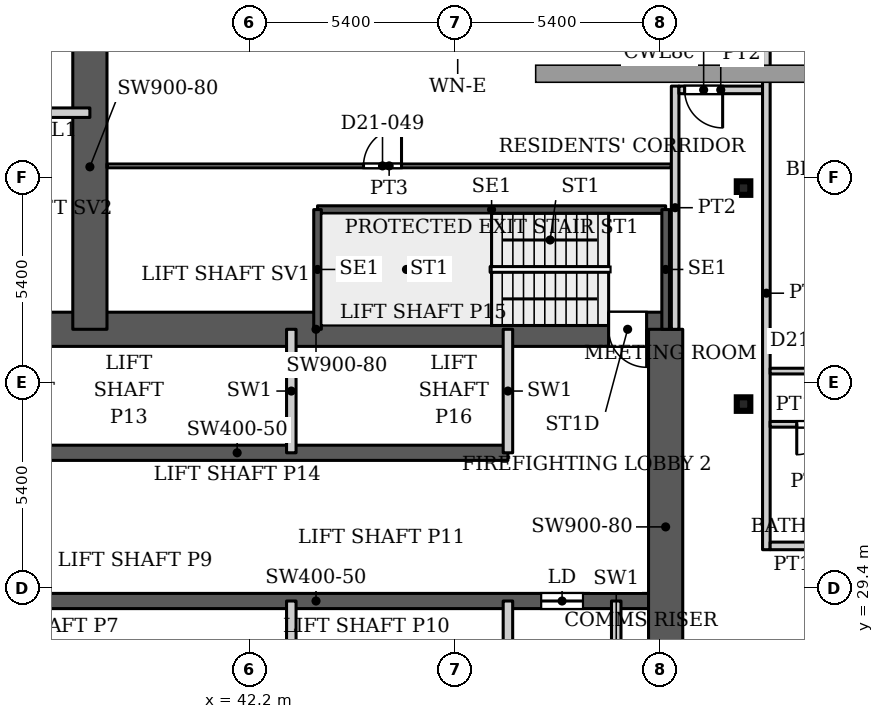
"""IFC4 building model, lengths in metres.
Left out: names, types, materials, properties, quantities, classifications, styles, units other than length and angle.
Written with IfcOpenShell. Run it as: python <this file> out.ifc"""

import sys

from ifc_helpers import new_model, si_unit, direction, frame, frame_2d, origin, origin_2d, place, context, subcontext, project, spatial, rectangle, hollow_rectangle, extrude, source, transform, mapped, element, fill, save


model = new_model("IFC4")
c1 = context("Model", 3, precision=1e-05, world=origin(), true_north=direction((0.0, 1.0)))
c2 = subcontext(c1, "Body", "Model", "MODEL_VIEW")
j1 = project(units=[si_unit("LENGTHUNIT", "METRE"), si_unit("PLANEANGLEUNIT", "RADIAN")], contexts=[c1])
p1 = place(None, origin())
s1 = spatial("IfcSite", under=j1, at=p1, CompositionType="ELEMENT")
p2 = place(p1, origin())
s2 = spatial("IfcBuilding", under=s1, at=p2, CompositionType="ELEMENT")
p3 = place(p2, frame((0.0, 0.0, 98.0)))
s3 = spatial("IfcBuildingStorey", under=s2, at=p3, CompositionType="ELEMENT", Elevation=98.0)
for number, where, z_axis, x_axis in (
    (1, (55.2, 34.232, 0.0), (0.0, 0.0, 1.0), (1.0, 0.0, 0.0)),
    (2, (55.2, 39.916, 0.0), (0.0, 0.0, 1.0), (1.0, 0.0, 0.0)),
):
    element("IfcColumn", number, at=place(p3, frame(where, z_axis=z_axis, x_axis=x_axis)), inside=s3, PredefinedType="COLUMN", context=c2, shape_type="SweptSolid", body=[
        extrude(hollow_rectangle(XDim=0.356, YDim=0.356, WallThickness=0.016, InnerFilletRadius=0.016, OuterFilletRadius=0.032, at=origin_2d()), origin(), (0.0, 0.0, 1.0), 3.9),
    ])
p4 = place(p3, frame((34.75, 29.05, 0.0), z_axis=(0.0, 0.0, 1.0), x_axis=(1.0, 0.0, 0.0)))
e3 = element("IfcWall", 3, at=p4, inside=s3, PredefinedType="SHEAR", context=c2, shape_type="SweptSolid", body=[
    extrude(rectangle(XDim=18.4, YDim=0.4, at=frame_2d((9.2, 0.0))), origin(), (0.0, 0.0, 1.0), 3.9),
])
p5 = place(p4, frame((15.125, 0.0, 0.0)))
e4 = element("IfcOpeningElement", 4, at=p5, cuts=e3, PredefinedType="OPENING", context=c2, shape_type="SweptSolid", body=[
    extrude(rectangle(XDim=1.1, YDim=2.2, at=frame_2d((0.55, 1.1))), frame((0.0, 0.21, 0.0), z_axis=(0.0, -1.0, 0.0), x_axis=(1.0, 0.0, 0.0)), (0.0, 0.0, 1.0), 0.42),
])
p6 = place(p3, frame((34.75, 32.95, 0.0), z_axis=(0.0, 0.0, 1.0), x_axis=(1.0, 0.0, 0.0)))
e5 = element("IfcWall", 5, at=p6, inside=s3, PredefinedType="SHEAR", context=c2, shape_type="SweptSolid", body=[
    extrude(rectangle(XDim=14.25, YDim=0.4, at=frame_2d((7.125, 0.0))), origin(), (0.0, 0.0, 1.0), 3.9),
])
p7 = place(p3, frame((34.75, 36.2, 0.0), z_axis=(0.0, 0.0, 1.0), x_axis=(1.0, 0.0, 0.0)))
e6 = element("IfcWall", 6, at=p7, inside=s3, PredefinedType="SHEAR", context=c2, shape_type="SweptSolid", body=[
    extrude(rectangle(XDim=18.4, YDim=0.9, at=frame_2d((9.2, 0.0))), origin(), (0.0, 0.0, 1.0), 3.9),
])
p8 = place(p7, frame((16.9, 0.0, 0.0)))
e7 = element("IfcOpeningElement", 7, at=p8, cuts=e6, PredefinedType="OPENING", context=c2, shape_type="SweptSolid", body=[
    extrude(rectangle(XDim=1.0, YDim=2.2, at=frame_2d((0.5, 1.1))), frame((0.0, 0.46, 0.0), z_axis=(0.0, -1.0, 0.0), x_axis=(1.0, 0.0, 0.0)), (0.0, 0.0, 1.0), 0.92),
])
p9 = place(p3, frame((38.0, 36.2, 0.0), z_axis=(0.0, 0.0, 1.0), x_axis=(0.0, 1.0, 0.0)))
e8 = element("IfcWall", 8, at=p9, inside=s3, PredefinedType="SHEAR", context=c2, shape_type="SweptSolid", body=[
    extrude(rectangle(XDim=8.55, YDim=0.9, at=frame_2d((4.275, 0.0))), origin(), (0.0, 0.0, 1.0), 3.9),
])
p10 = place(p3, frame((53.15, 25.8, 0.0), z_axis=(0.0, 0.0, 1.0), x_axis=(0.0, 1.0, 0.0)))
e9 = element("IfcWall", 9, at=p10, inside=s3, PredefinedType="SHEAR", context=c2, shape_type="SweptSolid", body=[
    extrude(rectangle(XDim=10.4, YDim=0.9, at=frame_2d((5.2, 0.0))), origin(), (0.0, 0.0, 1.0), 3.9),
])
p11 = place(p3, frame((43.99, 39.35, 0.0), z_axis=(0.0, 0.0, 1.0), x_axis=(1.0, 0.0, 0.0)))
e10 = element("IfcWall", 10, at=p11, inside=s3, PredefinedType="SHEAR", context=c2, shape_type="SweptSolid", body=[
    extrude(rectangle(XDim=9.16, YDim=0.2, at=frame_2d((4.58, 0.0))), origin(), (0.0, 0.0, 1.0), 3.9),
])
for number, where, z_axis, x_axis in (
    (11, (43.99, 36.2, 0.0), (0.0, 0.0, 1.0), (0.0, 1.0, 0.0)),
    (12, (53.15, 36.2, 0.0), (0.0, 0.0, 1.0), (0.0, 1.0, 0.0)),
):
    element("IfcWall", number, at=place(p3, frame(where, z_axis=z_axis, x_axis=x_axis)), inside=s3, PredefinedType="SHEAR", context=c2, shape_type="SweptSolid", body=[
        extrude(rectangle(XDim=3.15, YDim=0.2, at=frame_2d((1.575, 0.0))), origin(), (0.0, 0.0, 1.0), 3.9),
    ])
for number, where, z_axis, x_axis in (
    (13, (43.3, 25.8, 0.0), (0.0, 0.0, 1.0), (0.0, 1.0, 0.0)),
    (14, (43.3, 32.95, 0.0), (0.0, 0.0, 1.0), (0.0, 1.0, 0.0)),
    (15, (49.0, 25.8, 0.0), (0.0, 0.0, 1.0), (0.0, 1.0, 0.0)),
    (16, (49.0, 32.95, 0.0), (0.0, 0.0, 1.0), (0.0, 1.0, 0.0)),
    (17, (51.85, 25.8, 0.0), (0.0, 0.0, 1.0), (0.0, 1.0, 0.0)),
    (18, (34.75, 41.9, 0.0), (0.0, 0.0, 1.0), (1.0, 0.0, 0.0)),
):
    element("IfcWall", number, at=place(p3, frame(where, z_axis=z_axis, x_axis=x_axis)), inside=s3, PredefinedType="PARTITIONING", context=c2, shape_type="SweptSolid", body=[
        extrude(rectangle(XDim=3.25, YDim=0.25, at=frame_2d((1.625, 0.0))), origin(), (0.0, 0.0, 1.0), 3.9),
    ])
p12 = place(p3, frame((38.449, 40.5, 0.0), z_axis=(0.0, 0.0, 1.0), x_axis=(1.0, 0.0, 0.0)))
e19 = element("IfcWall", 19, at=p12, inside=s3, PredefinedType="PARTITIONING", context=c2, shape_type="SweptSolid", body=[
    extrude(rectangle(XDim=14.851, YDim=0.1, at=frame_2d((7.426, 0.0))), origin(), (0.0, 0.0, 1.0), 3.6),
])
p13 = place(p12, frame((6.751, 0.0, 0.0)))
e20 = element("IfcOpeningElement", 20, at=p13, cuts=e19, PredefinedType="OPENING", context=c2, shape_type="SweptSolid", body=[
    extrude(rectangle(XDim=1.0, YDim=2.1, at=frame_2d((0.5, 1.05))), frame((0.0, 0.06, 0.0), z_axis=(0.0, -1.0, 0.0), x_axis=(1.0, 0.0, 0.0)), (0.0, 0.0, 1.0), 0.12),
])
p14 = place(p3, frame((53.4, 36.199, 0.0), z_axis=(0.0, 0.0, 1.0), x_axis=(0.0, 1.0, 0.0)))
e21 = element("IfcWall", 21, at=p14, inside=s3, PredefinedType="PARTITIONING", context=c2, shape_type="SweptSolid", body=[
    extrude(rectangle(XDim=6.401, YDim=0.2, at=frame_2d((3.201, 0.0))), origin(), (0.0, 0.0, 1.0), 3.6),
])
p15 = place(p3, frame((53.5, 42.5, 0.0), z_axis=(0.0, 0.0, 1.0), x_axis=(1.0, 0.0, 0.0)))
e22 = element("IfcWall", 22, at=p15, inside=s3, PredefinedType="PARTITIONING", context=c2, shape_type="SweptSolid", body=[
    extrude(rectangle(XDim=2.2, YDim=0.2, at=frame_2d((1.1, 0.0))), origin(), (0.0, 0.0, 1.0), 3.6),
])
p16 = place(p15, frame((0.15, 0.0, 0.0)))
e23 = element("IfcOpeningElement", 23, at=p16, cuts=e22, PredefinedType="OPENING", context=c2, shape_type="SweptSolid", body=[
    extrude(rectangle(XDim=1.0, YDim=2.1, at=frame_2d((0.5, 1.05))), frame((0.0, 0.11, 0.0), z_axis=(0.0, -1.0, 0.0), x_axis=(1.0, 0.0, 0.0)), (0.0, 0.0, 1.0), 0.22),
])
p17 = place(p3, frame((55.8, 30.4, 0.0), z_axis=(0.0, 0.0, 1.0), x_axis=(0.0, 1.0, 0.0)))
e24 = element("IfcWall", 24, at=p17, inside=s3, PredefinedType="PARTITIONING", context=c2, shape_type="SweptSolid", body=[
    extrude(rectangle(XDim=13.5, YDim=0.2, at=frame_2d((6.75, 0.0))), origin(), (0.0, 0.0, 1.0), 3.6),
])
p18 = place(p3, frame((55.9, 30.5, 0.0), z_axis=(0.0, 0.0, 1.0), x_axis=(1.0, 0.0, 0.0)))
e25 = element("IfcWall", 25, at=p18, inside=s3, PredefinedType="PARTITIONING", context=c2, shape_type="SweptSolid", body=[
    extrude(rectangle(XDim=42.2, YDim=0.2, at=frame_2d((21.1, 0.0))), origin(), (0.0, 0.0, 1.0), 3.6),
])
p19 = place(p18, frame((2.7, 0.0, 0.0)))
e26 = element("IfcOpeningElement", 26, at=p19, cuts=e25, PredefinedType="OPENING", context=c2, shape_type="SweptSolid", body=[
    extrude(rectangle(XDim=1.0, YDim=2.1, at=frame_2d((0.5, 1.05))), frame((0.0, 0.11, 0.0), z_axis=(0.0, -1.0, 0.0), x_axis=(1.0, 0.0, 0.0)), (0.0, 0.0, 1.0), 0.22),
])
p20 = place(p18, frame((15.3, 0.0, 0.0)))
e27 = element("IfcOpeningElement", 27, at=p20, cuts=e25, PredefinedType="OPENING", context=c2, shape_type="SweptSolid", body=[
    extrude(rectangle(XDim=1.0, YDim=2.1, at=frame_2d((0.5, 1.05))), frame((0.0, 0.11, 0.0), z_axis=(0.0, -1.0, 0.0), x_axis=(1.0, 0.0, 0.0)), (0.0, 0.0, 1.0), 0.22),
])
p21 = place(p18, frame((33.3, 0.0, 0.0)))
e28 = element("IfcOpeningElement", 28, at=p21, cuts=e25, PredefinedType="OPENING", context=c2, shape_type="SweptSolid", body=[
    extrude(rectangle(XDim=1.0, YDim=2.1, at=frame_2d((0.5, 1.05))), frame((0.0, 0.11, 0.0), z_axis=(0.0, -1.0, 0.0), x_axis=(1.0, 0.0, 0.0)), (0.0, 0.0, 1.0), 0.22),
])
p22 = place(p3, frame((55.9, 33.7, 0.0), z_axis=(0.0, 0.0, 1.0), x_axis=(1.0, 0.0, 0.0)))
e29 = element("IfcWall", 29, at=p22, inside=s3, PredefinedType="PARTITIONING", context=c2, shape_type="SweptSolid", body=[
    extrude(rectangle(XDim=2.225, YDim=0.15, at=frame_2d((1.113, 0.0))), origin(), (0.0, 0.0, 1.0), 3.6),
])
p23 = place(p22, frame((0.7, 0.0, 0.0)))
e30 = element("IfcOpeningElement", 30, at=p23, cuts=e29, PredefinedType="OPENING", context=c2, shape_type="SweptSolid", body=[
    extrude(rectangle(XDim=0.8, YDim=2.1, at=frame_2d((0.4, 1.05))), frame((0.0, 0.085, 0.0), z_axis=(0.0, -1.0, 0.0), x_axis=(1.0, 0.0, 0.0)), (0.0, 0.0, 1.0), 0.17),
])
p24 = place(p3, frame((55.9, 35.1, 0.0), z_axis=(0.0, 0.0, 1.0), x_axis=(1.0, 0.0, 0.0)))
e31 = element("IfcWall", 31, at=p24, inside=s3, PredefinedType="PARTITIONING", context=c2, shape_type="SweptSolid", body=[
    extrude(rectangle(XDim=11.2, YDim=0.15, at=frame_2d((5.6, 0.0))), origin(), (0.0, 0.0, 1.0), 3.6),
])
p25 = place(p24, frame((1.4, 0.0, 0.0)))
e32 = element("IfcOpeningElement", 32, at=p25, cuts=e31, PredefinedType="OPENING", context=c2, shape_type="SweptSolid", body=[
    extrude(rectangle(XDim=0.9, YDim=2.1, at=frame_2d((0.45, 1.05))), frame((0.0, 0.085, 0.0), z_axis=(0.0, -1.0, 0.0), x_axis=(1.0, 0.0, 0.0)), (0.0, 0.0, 1.0), 0.17),
])
p26 = place(p24, frame((5.1, 0.0, 0.0)))
e33 = element("IfcOpeningElement", 33, at=p26, cuts=e31, PredefinedType="OPENING", context=c2, shape_type="SweptSolid", body=[
    extrude(rectangle(XDim=1.0, YDim=2.1, at=frame_2d((0.5, 1.05))), frame((0.0, 0.085, 0.0), z_axis=(0.0, -1.0, 0.0), x_axis=(1.0, 0.0, 0.0)), (0.0, 0.0, 1.0), 0.17),
])
p27 = place(p24, frame((7.85, 0.0, 0.0)))
e34 = element("IfcOpeningElement", 34, at=p27, cuts=e31, PredefinedType="OPENING", context=c2, shape_type="SweptSolid", body=[
    extrude(rectangle(XDim=0.9, YDim=2.1, at=frame_2d((0.45, 1.05))), frame((0.0, 0.085, 0.0), z_axis=(0.0, -1.0, 0.0), x_axis=(1.0, 0.0, 0.0)), (0.0, 0.0, 1.0), 0.17),
])
m1 = source(origin(), c2, "Body", "SweptSolid", [
    extrude(rectangle(XDim=1.1, YDim=2.2, at=frame_2d((0.55, 1.1))), frame((0.0, 0.025, 0.0), z_axis=(0.0, -1.0, 0.0), x_axis=(1.0, 0.0, 0.0)), (0.0, 0.0, 1.0), 0.05),
])
p28 = place(p5, origin())
e35 = element("IfcDoor", 35, at=p28, inside=s3, OperationType="SLIDING_TO_LEFT", PredefinedType="DOOR", context=c2, shape_type="MappedRepresentation", body=[
    mapped(m1, transform((0.0, 0.0, 0.0), x_axis=(1.0, 0.0, 0.0), y_axis=(0.0, 1.0, 0.0), z_axis=(0.0, 0.0, 1.0), scale=1.0)),
])
fill(e4, e35)
m2 = source(origin(), c2, "Body", "SweptSolid", [
    extrude(rectangle(XDim=1.0, YDim=2.2, at=frame_2d((0.5, 1.1))), frame((0.0, 0.025, 0.0), z_axis=(0.0, -1.0, 0.0), x_axis=(1.0, 0.0, 0.0)), (0.0, 0.0, 1.0), 0.05),
])
p29 = place(p8, origin())
e36 = element("IfcDoor", 36, at=p29, inside=s3, OperationType="SINGLE_SWING_RIGHT", PredefinedType="DOOR", context=c2, shape_type="MappedRepresentation", body=[
    mapped(m2, transform((0.0, 0.0, 0.0), x_axis=(1.0, 0.0, 0.0), y_axis=(0.0, 1.0, 0.0), z_axis=(0.0, 0.0, 1.0), scale=1.0)),
])
fill(e7, e36)
m3 = source(origin(), c2, "Body", "SweptSolid", [
    extrude(rectangle(XDim=0.8, YDim=2.1, at=frame_2d((0.4, 1.05))), frame((0.0, 0.025, 0.0), z_axis=(0.0, -1.0, 0.0), x_axis=(1.0, 0.0, 0.0)), (0.0, 0.0, 1.0), 0.05),
])
p30 = place(p23, origin())
e37 = element("IfcDoor", 37, at=p30, inside=s3, OperationType="SINGLE_SWING_RIGHT", PredefinedType="DOOR", context=c2, shape_type="MappedRepresentation", body=[
    mapped(m3, transform((0.0, 0.0, 0.0), x_axis=(1.0, 0.0, 0.0), y_axis=(0.0, 1.0, 0.0), z_axis=(0.0, 0.0, 1.0), scale=1.0)),
])
fill(e30, e37)
m4 = source(origin(), c2, "Body", "SweptSolid", [
    extrude(rectangle(XDim=1.0, YDim=2.1, at=frame_2d((0.5, 1.05))), frame((0.0, 0.025, 0.0), z_axis=(0.0, -1.0, 0.0), x_axis=(1.0, 0.0, 0.0)), (0.0, 0.0, 1.0), 0.05),
])
p31 = place(p13, origin())
e38 = element("IfcDoor", 38, at=p31, inside=s3, OperationType="SINGLE_SWING_LEFT", PredefinedType="DOOR", context=c2, shape_type="MappedRepresentation", body=[
    mapped(m4, transform((0.0, 0.0, 0.0), x_axis=(1.0, 0.0, 0.0), y_axis=(0.0, 1.0, 0.0), z_axis=(0.0, 0.0, 1.0), scale=1.0)),
])
fill(e20, e38)
m5 = source(origin(), c2, "Body", "SweptSolid", [
    extrude(rectangle(XDim=1.0, YDim=2.1, at=frame_2d((0.5, 1.05))), frame((0.0, 0.025, 0.0), z_axis=(0.0, -1.0, 0.0), x_axis=(1.0, 0.0, 0.0)), (0.0, 0.0, 1.0), 0.05),
])
p32 = place(p16, origin())
e39 = element("IfcDoor", 39, at=p32, inside=s3, OperationType="SINGLE_SWING_RIGHT", PredefinedType="DOOR", context=c2, shape_type="MappedRepresentation", body=[
    mapped(m5, transform((0.0, 0.0, 0.0), x_axis=(1.0, 0.0, 0.0), y_axis=(0.0, 1.0, 0.0), z_axis=(0.0, 0.0, 1.0), scale=1.0)),
])
fill(e23, e39)
save(model, sys.argv[1])
